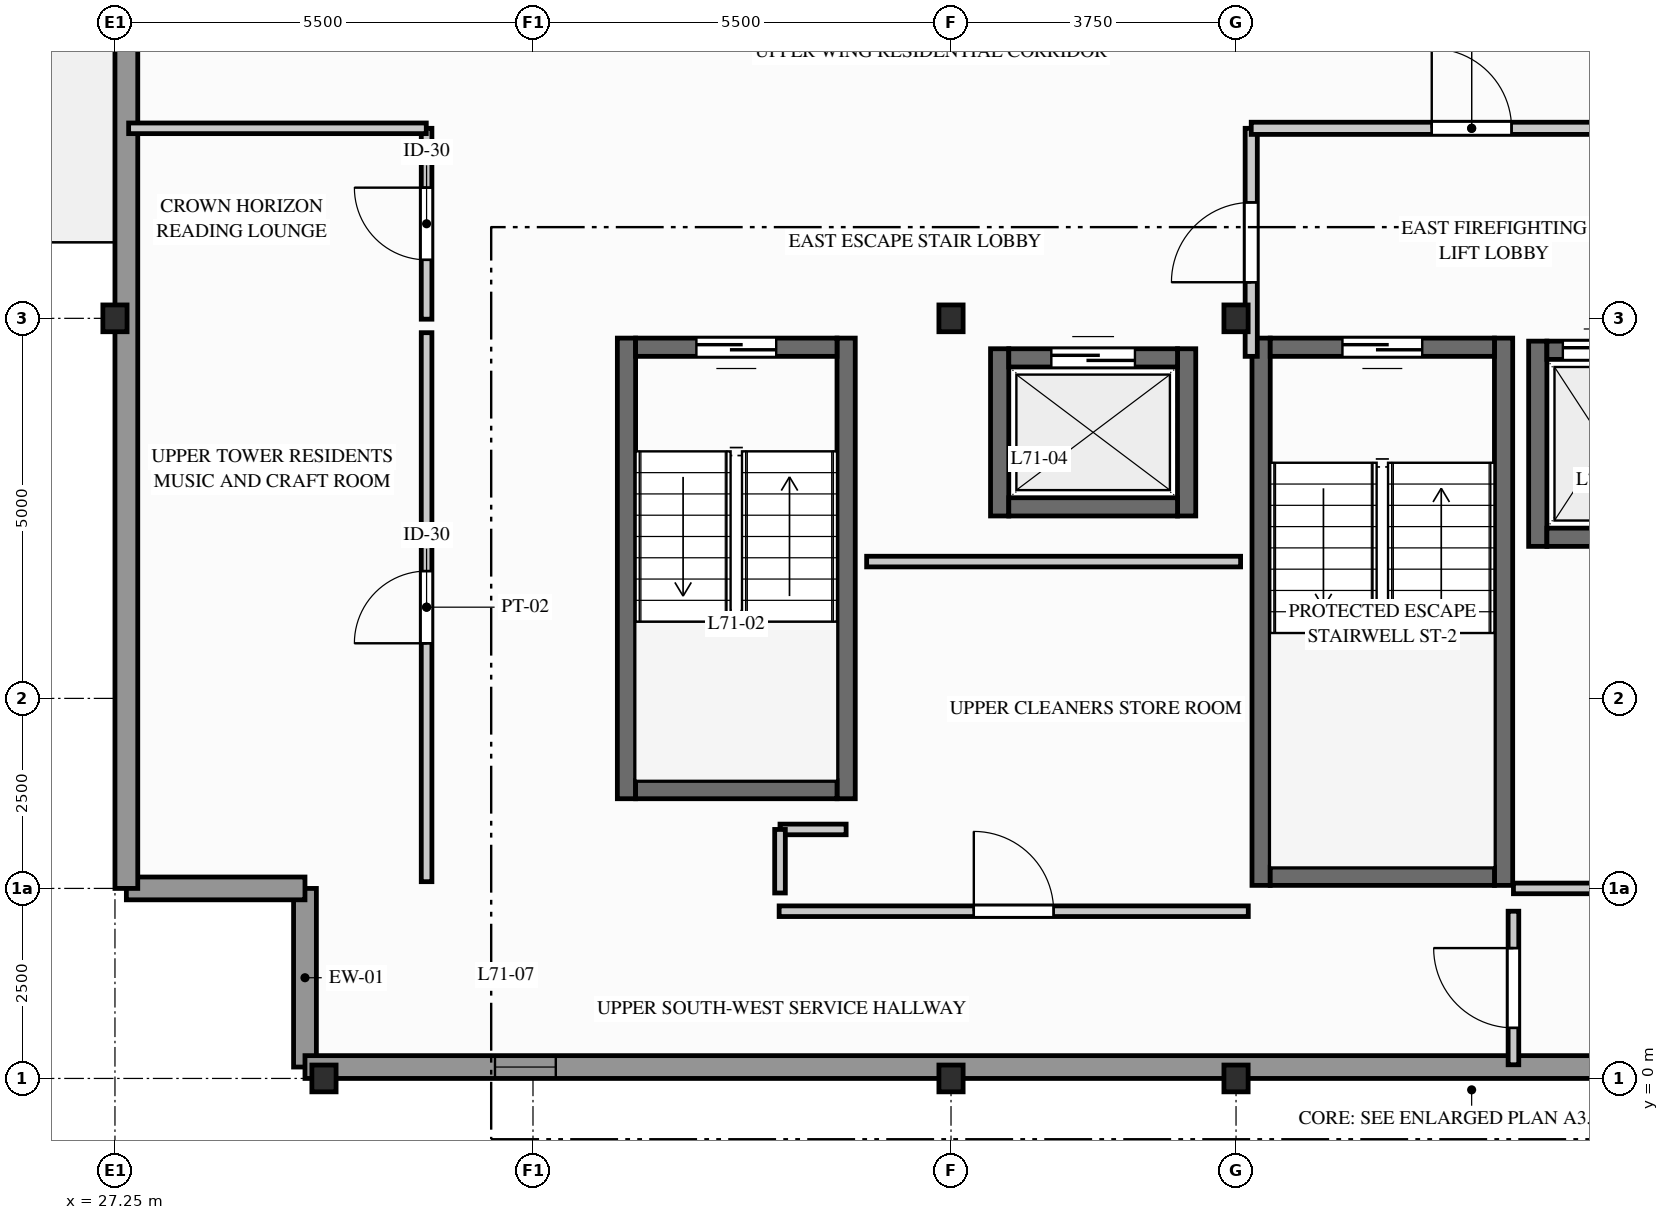
"""IFC4 building model, lengths in metres.
Left out: names, types, materials, properties, quantities, classifications, styles, units other than length and angle.
Written with IfcOpenShell. Run it as: python <this file> out.ifc"""

import sys

from ifc_helpers import new_model, si_unit, direction, frame, frame_2d, origin, origin_2d, place, context, subcontext, project, spatial, rectangle, i_section, extrude, element, fill, save


model = new_model("IFC4")
c1 = context("Model", 3, precision=1e-05, world=origin(), true_north=direction((0.0, 1.0)))
c2 = subcontext(c1, "Body", "Model", "MODEL_VIEW")
j1 = project(units=[si_unit("LENGTHUNIT", "METRE"), si_unit("PLANEANGLEUNIT", "RADIAN")], contexts=[c1])
p1 = place(None, origin())
s1 = spatial("IfcSite", under=j1, at=p1, CompositionType="ELEMENT")
p2 = place(p1, origin())
s2 = spatial("IfcBuilding", under=s1, at=p2, CompositionType="ELEMENT")
p3 = place(p2, frame((0.0, 0.0, 233.5)))
s3 = spatial("IfcBuildingStorey", under=s2, at=p3, CompositionType="ELEMENT", Elevation=233.5)
for number, where, z_axis, x_axis in (
    (1, (27.25, 10.0, 0.0), (0.0, 0.0, 1.0), (1.0, 0.0, 0.0)),
    (2, (30.0, 0.0, 0.0), (0.0, 0.0, 1.0), (1.0, 0.0, 0.0)),
    (3, (38.25, 0.0, 0.0), (0.0, 0.0, 1.0), (1.0, 0.0, 0.0)),
    (4, (38.25, 10.0, 0.0), (0.0, 0.0, 1.0), (1.0, 0.0, 0.0)),
    (5, (42.0, 0.0, 0.0), (0.0, 0.0, 1.0), (1.0, 0.0, 0.0)),
    (6, (42.0, 10.0, 0.0), (0.0, 0.0, 1.0), (1.0, 0.0, 0.0)),
):
    element("IfcColumn", number, at=place(p3, frame(where, z_axis=z_axis, x_axis=x_axis)), inside=s3, PredefinedType="COLUMN", context=c2, shape_type="SweptSolid", body=[
        extrude(i_section(OverallWidth=0.318, OverallDepth=0.353, WebThickness=0.023, FlangeThickness=0.038, FilletRadius=0.015, at=origin_2d()), origin(), (0.0, 0.0, 1.0), 3.1),
    ])
for number, where, z_axis, x_axis in (
    (7, (29.75, 2.5, 0.0), (0.0, 0.0, 1.0), (0.0, -1.0, 0.0)),
    (8, (27.4, 2.5, 0.0), (0.0, 0.0, 1.0), (1.0, 0.0, 0.0)),
):
    element("IfcWall", number, at=place(p3, frame(where, z_axis=z_axis, x_axis=x_axis)), inside=s3, PredefinedType="STANDARD", context=c2, shape_type="SweptSolid", body=[
        extrude(rectangle(XDim=2.35, YDim=0.3, at=frame_2d((1.175, 0.0))), origin(), (0.0, 0.0, 1.0), 2.89),
    ])
p4 = place(p3, frame((29.75, 0.15, 0.0), z_axis=(0.0, 0.0, 1.0), x_axis=(1.0, 0.0, 0.0)))
e9 = element("IfcWall", 9, at=p4, inside=s3, PredefinedType="STANDARD", context=c2, shape_type="SweptSolid", body=[
    extrude(rectangle(XDim=27.75, YDim=0.3, at=frame_2d((13.875, 0.0))), origin(), (0.0, 0.0, 1.0), 2.332),
])
p5 = place(p4, frame((2.5, 0.0, 0.712)))
e10 = element("IfcOpeningElement", 10, at=p5, cuts=e9, PredefinedType="OPENING", context=c2, shape_type="SweptSolid", body=[
    extrude(rectangle(XDim=0.8, YDim=1.4, at=frame_2d((0.4, 0.7))), frame((0.0, 0.16, 0.0), z_axis=(0.0, -1.0, 0.0), x_axis=(1.0, 0.0, 0.0)), (0.0, 0.0, 1.0), 0.32),
])
p6 = place(p4, frame((19.95, 0.0, 0.312)))
e11 = element("IfcOpeningElement", 11, at=p6, cuts=e9, PredefinedType="OPENING", context=c2, shape_type="SweptSolid", body=[
    extrude(rectangle(XDim=1.5, YDim=1.8, at=frame_2d((0.75, 0.9))), frame((0.0, 0.16, 0.0), z_axis=(0.0, -1.0, 0.0), x_axis=(1.0, 0.0, 0.0)), (0.0, 0.0, 1.0), 0.32),
])
p7 = place(p3, frame((27.4, 24.0, 0.0), z_axis=(0.0, 0.0, 1.0), x_axis=(0.0, -1.0, 0.0)))
e12 = element("IfcWall", 12, at=p7, inside=s3, PredefinedType="STANDARD", context=c2, shape_type="SweptSolid", body=[
    extrude(rectangle(XDim=21.5, YDim=0.3, at=frame_2d((10.75, 0.0))), origin(), (0.0, 0.0, 1.0), 2.332),
])
p8 = place(p7, frame((5.5, 0.0, 0.0)))
e13 = element("IfcOpeningElement", 13, at=p8, cuts=e12, PredefinedType="OPENING", context=c2, shape_type="SweptSolid", body=[
    extrude(rectangle(XDim=1.1, YDim=2.2, at=frame_2d((0.55, 1.1))), frame((0.0, 0.16, 0.0), z_axis=(0.0, -1.0, 0.0), x_axis=(1.0, 0.0, 0.0)), (0.0, 0.0, 1.0), 0.32),
])
p9 = place(p7, frame((1.3, 0.0, 0.312)))
e14 = element("IfcOpeningElement", 14, at=p9, cuts=e12, PredefinedType="OPENING", context=c2, shape_type="SweptSolid", body=[
    extrude(rectangle(XDim=1.5, YDim=1.8, at=frame_2d((0.75, 0.9))), frame((0.0, 0.16, 0.0), z_axis=(0.0, -1.0, 0.0), x_axis=(1.0, 0.0, 0.0)), (0.0, 0.0, 1.0), 0.32),
])
for number, where, z_axis, x_axis in (
    (15, (42.33, 2.54, 0.0), (0.0, 0.0, 1.0), (0.0, 1.0, 0.0)),
    (16, (45.52, 2.54, 0.0), (0.0, 0.0, 1.0), (0.0, 1.0, 0.0)),
):
    element("IfcWall", number, at=place(p3, frame(where, z_axis=z_axis, x_axis=x_axis)), inside=s3, PredefinedType="SHEAR", context=c2, shape_type="SweptSolid", body=[
        extrude(rectangle(XDim=7.2, YDim=0.24, at=frame_2d((3.6, 0.0))), origin(), (0.0, 0.0, 1.0), 2.89),
    ])
p10 = place(p3, frame((42.45, 2.66, 0.0), z_axis=(0.0, 0.0, 1.0), x_axis=(1.0, 0.0, 0.0)))
e17 = element("IfcWall", 17, at=p10, inside=s3, PredefinedType="SHEAR", context=c2, shape_type="SweptSolid", body=[
    extrude(rectangle(XDim=2.95, YDim=0.24, at=frame_2d((1.475, 0.0))), origin(), (0.0, 0.0, 1.0), 2.89),
])
p11 = place(p3, frame((45.4, 9.62, 0.0), z_axis=(0.0, 0.0, 1.0), x_axis=(-1.0, 0.0, 0.0)))
e18 = element("IfcWall", 18, at=p11, inside=s3, PredefinedType="SHEAR", context=c2, shape_type="SweptSolid", body=[
    extrude(rectangle(XDim=2.95, YDim=0.24, at=frame_2d((1.475, 0.0))), origin(), (0.0, 0.0, 1.0), 2.89),
])
p12 = place(p11, frame((0.95, 0.0, 0.0)))
e19 = element("IfcOpeningElement", 19, at=p12, cuts=e18, PredefinedType="OPENING", context=c2, shape_type="SweptSolid", body=[
    extrude(rectangle(XDim=1.05, YDim=2.06, at=frame_2d((0.525, 1.03))), frame((0.0, 0.13, 0.0), z_axis=(0.0, -1.0, 0.0), x_axis=(1.0, 0.0, 0.0)), (0.0, 0.0, 1.0), 0.26),
])
for number, where, z_axis, x_axis in (
    (20, (33.98, 3.68, 0.0), (0.0, 0.0, 1.0), (0.0, 1.0, 0.0)),
    (21, (36.87, 3.68, 0.0), (0.0, 0.0, 1.0), (0.0, 1.0, 0.0)),
):
    element("IfcWall", number, at=place(p3, frame(where, z_axis=z_axis, x_axis=x_axis)), inside=s3, PredefinedType="SHEAR", context=c2, shape_type="SweptSolid", body=[
        extrude(rectangle(XDim=6.06, YDim=0.24, at=frame_2d((3.03, 0.0))), origin(), (0.0, 0.0, 1.0), 2.89),
    ])
p13 = place(p3, frame((34.1, 3.8, 0.0), z_axis=(0.0, 0.0, 1.0), x_axis=(1.0, 0.0, 0.0)))
e22 = element("IfcWall", 22, at=p13, inside=s3, PredefinedType="SHEAR", context=c2, shape_type="SweptSolid", body=[
    extrude(rectangle(XDim=2.65, YDim=0.24, at=frame_2d((1.325, 0.0))), origin(), (0.0, 0.0, 1.0), 2.89),
])
p14 = place(p3, frame((36.75, 9.62, 0.0), z_axis=(0.0, 0.0, 1.0), x_axis=(-1.0, 0.0, 0.0)))
e23 = element("IfcWall", 23, at=p14, inside=s3, PredefinedType="SHEAR", context=c2, shape_type="SweptSolid", body=[
    extrude(rectangle(XDim=2.65, YDim=0.24, at=frame_2d((1.325, 0.0))), origin(), (0.0, 0.0, 1.0), 2.89),
])
p15 = place(p14, frame((0.8, 0.0, 0.0)))
e24 = element("IfcOpeningElement", 24, at=p15, cuts=e23, PredefinedType="OPENING", context=c2, shape_type="SweptSolid", body=[
    extrude(rectangle(XDim=1.05, YDim=2.06, at=frame_2d((0.525, 1.03))), frame((0.0, 0.13, 0.0), z_axis=(0.0, -1.0, 0.0), x_axis=(1.0, 0.0, 0.0)), (0.0, 0.0, 1.0), 0.26),
])
p16 = place(p3, frame((45.97, 7.0, 0.0), z_axis=(0.0, 0.0, 1.0), x_axis=(0.0, 1.0, 0.0)))
e25 = element("IfcWall", 25, at=p16, inside=s3, PredefinedType="SHEAR", context=c2, shape_type="SweptSolid", body=[
    extrude(rectangle(XDim=2.7, YDim=0.24, at=frame_2d((1.35, 0.0))), origin(), (0.0, 0.0, 1.0), 2.89),
])
p17 = place(p3, frame((46.09, 7.12, 0.0), z_axis=(0.0, 0.0, 1.0), x_axis=(1.0, 0.0, 0.0)))
e26 = element("IfcWall", 26, at=p17, inside=s3, PredefinedType="SHEAR", context=c2, shape_type="SweptSolid", body=[
    extrude(rectangle(XDim=1.52, YDim=0.24, at=frame_2d((0.76, 0.0))), origin(), (0.0, 0.0, 1.0), 2.89),
])
p18 = place(p3, frame((46.09, 9.58, 0.0), z_axis=(0.0, 0.0, 1.0), x_axis=(1.0, 0.0, 0.0)))
e27 = element("IfcWall", 27, at=p18, inside=s3, PredefinedType="SHEAR", context=c2, shape_type="SweptSolid", body=[
    extrude(rectangle(XDim=1.52, YDim=0.24, at=frame_2d((0.76, 0.0))), origin(), (0.0, 0.0, 1.0), 2.89),
])
p19 = place(p18, frame((0.21, 0.0, 0.0)))
e28 = element("IfcOpeningElement", 28, at=p19, cuts=e27, PredefinedType="OPENING", context=c2, shape_type="SweptSolid", body=[
    extrude(rectangle(XDim=1.1, YDim=2.06, at=frame_2d((0.55, 1.03))), frame((0.0, 0.13, 0.0), z_axis=(0.0, -1.0, 0.0), x_axis=(1.0, 0.0, 0.0)), (0.0, 0.0, 1.0), 0.26),
])
for number, where, z_axis, x_axis in (
    (29, (38.89, 7.4, 0.0), (0.0, 0.0, 1.0), (0.0, 1.0, 0.0)),
    (30, (41.35, 7.4, 0.0), (0.0, 0.0, 1.0), (0.0, 1.0, 0.0)),
):
    element("IfcWall", number, at=place(p3, frame(where, z_axis=z_axis, x_axis=x_axis)), inside=s3, PredefinedType="SHEAR", context=c2, shape_type="SweptSolid", body=[
        extrude(rectangle(XDim=2.2, YDim=0.24, at=frame_2d((1.1, 0.0))), origin(), (0.0, 0.0, 1.0), 2.89),
    ])
p20 = place(p3, frame((39.01, 7.52, 0.0), z_axis=(0.0, 0.0, 1.0), x_axis=(1.0, 0.0, 0.0)))
e31 = element("IfcWall", 31, at=p20, inside=s3, PredefinedType="SHEAR", context=c2, shape_type="SweptSolid", body=[
    extrude(rectangle(XDim=2.22, YDim=0.24, at=frame_2d((1.11, 0.0))), origin(), (0.0, 0.0, 1.0), 2.89),
])
p21 = place(p3, frame((39.01, 9.48, 0.0), z_axis=(0.0, 0.0, 1.0), x_axis=(1.0, 0.0, 0.0)))
e32 = element("IfcWall", 32, at=p21, inside=s3, PredefinedType="SHEAR", context=c2, shape_type="SweptSolid", body=[
    extrude(rectangle(XDim=2.22, YDim=0.24, at=frame_2d((1.11, 0.0))), origin(), (0.0, 0.0, 1.0), 2.89),
])
p22 = place(p21, frame((0.56, 0.0, 0.0)))
e33 = element("IfcOpeningElement", 33, at=p22, cuts=e32, PredefinedType="OPENING", context=c2, shape_type="SweptSolid", body=[
    extrude(rectangle(XDim=1.1, YDim=2.06, at=frame_2d((0.55, 1.03))), frame((0.0, 0.13, 0.0), z_axis=(0.0, -1.0, 0.0), x_axis=(1.0, 0.0, 0.0)), (0.0, 0.0, 1.0), 0.26),
])
p23 = place(p3, frame((31.35, 2.589, 0.0), z_axis=(0.0, 0.0, 1.0), x_axis=(0.0, 1.0, 0.0)))
e34 = element("IfcWall", 34, at=p23, inside=s3, PredefinedType="PARTITIONING", context=c2, shape_type="SweptSolid", body=[
    extrude(rectangle(XDim=7.223, YDim=0.14, at=frame_2d((3.611, 0.0))), origin(), (0.0, 0.0, 1.0), 2.89),
])
p24 = place(p23, frame((3.136, 0.0, 0.0)))
e35 = element("IfcOpeningElement", 35, at=p24, cuts=e34, PredefinedType="OPENING", context=c2, shape_type="SweptSolid", body=[
    extrude(rectangle(XDim=0.95, YDim=2.05, at=frame_2d((0.475, 1.025))), frame((0.0, 0.08, 0.0), z_axis=(0.0, -1.0, 0.0), x_axis=(1.0, 0.0, 0.0)), (0.0, 0.0, 1.0), 0.16),
])
p25 = place(p3, frame((31.35, 9.989, 0.0), z_axis=(0.0, 0.0, 1.0), x_axis=(0.0, 1.0, 0.0)))
e36 = element("IfcWall", 36, at=p25, inside=s3, PredefinedType="PARTITIONING", context=c2, shape_type="SweptSolid", body=[
    extrude(rectangle(XDim=2.511, YDim=0.14, at=frame_2d((1.256, 0.0))), origin(), (0.0, 0.0, 1.0), 2.325),
])
p26 = place(p25, frame((0.781, 0.0, 0.0)))
e37 = element("IfcOpeningElement", 37, at=p26, cuts=e36, PredefinedType="OPENING", context=c2, shape_type="SweptSolid", body=[
    extrude(rectangle(XDim=0.95, YDim=2.05, at=frame_2d((0.475, 1.025))), frame((0.0, 0.08, 0.0), z_axis=(0.0, -1.0, 0.0), x_axis=(1.0, 0.0, 0.0)), (0.0, 0.0, 1.0), 0.16),
])
p27 = place(p3, frame((35.989, 2.2, 0.0), z_axis=(0.0, 0.0, 1.0), x_axis=(1.0, 0.0, 0.0)))
e38 = element("IfcWall", 38, at=p27, inside=s3, PredefinedType="PARTITIONING", context=c2, shape_type="SweptSolid", body=[
    extrude(rectangle(XDim=6.173, YDim=0.14, at=frame_2d((3.086, 0.0))), origin(), (0.0, 0.0, 1.0), 2.325),
])
p28 = place(p27, frame((2.561, 0.0, 0.0)))
e39 = element("IfcOpeningElement", 39, at=p28, cuts=e38, PredefinedType="OPENING", context=c2, shape_type="SweptSolid", body=[
    extrude(rectangle(XDim=1.05, YDim=2.06, at=frame_2d((0.525, 1.03))), frame((0.0, 0.08, 0.0), z_axis=(0.0, -1.0, 0.0), x_axis=(1.0, 0.0, 0.0)), (0.0, 0.0, 1.0), 0.16),
])
p29 = place(p3, frame((45.65, 0.18, 0.0), z_axis=(0.0, 0.0, 1.0), x_axis=(0.0, 1.0, 0.0)))
e40 = element("IfcWall", 40, at=p29, inside=s3, PredefinedType="PARTITIONING", context=c2, shape_type="SweptSolid", body=[
    extrude(rectangle(XDim=2.02, YDim=0.14, at=frame_2d((1.01, 0.0))), origin(), (0.0, 0.0, 1.0), 2.89),
])
p30 = place(p29, frame((0.485, 0.0, 0.0)))
e41 = element("IfcOpeningElement", 41, at=p30, cuts=e40, PredefinedType="OPENING", context=c2, shape_type="SweptSolid", body=[
    extrude(rectangle(XDim=1.05, YDim=2.06, at=frame_2d((0.525, 1.03))), frame((0.0, 0.08, 0.0), z_axis=(0.0, -1.0, 0.0), x_axis=(1.0, 0.0, 0.0)), (0.0, 0.0, 1.0), 0.16),
])
p31 = place(p3, frame((45.65, 2.5, 0.0), z_axis=(0.0, 0.0, 1.0), x_axis=(1.0, 0.0, 0.0)))
e42 = element("IfcWall", 42, at=p31, inside=s3, PredefinedType="PARTITIONING", context=c2, shape_type="SweptSolid", body=[
    extrude(rectangle(XDim=5.761, YDim=0.14, at=frame_2d((2.881, 0.0))), origin(), (0.0, 0.0, 1.0), 2.325),
])
p32 = place(p3, frame((42.2, 9.5, 0.0), z_axis=(0.0, 0.0, 1.0), x_axis=(0.0, 1.0, 0.0)))
e43 = element("IfcWall", 43, at=p32, inside=s3, PredefinedType="PARTITIONING", context=c2, shape_type="SweptSolid", body=[
    extrude(rectangle(XDim=3.0, YDim=0.16, at=frame_2d((1.5, 0.0))), origin(), (0.0, 0.0, 1.0), 2.325),
])
p33 = place(p32, frame((0.975, 0.0, 0.0)))
e44 = element("IfcOpeningElement", 44, at=p33, cuts=e43, PredefinedType="OPENING", context=c2, shape_type="SweptSolid", body=[
    extrude(rectangle(XDim=1.05, YDim=2.06, at=frame_2d((0.525, 1.03))), frame((0.0, 0.09, 0.0), z_axis=(0.0, -1.0, 0.0), x_axis=(1.0, 0.0, 0.0)), (0.0, 0.0, 1.0), 0.18),
])
p34 = place(p3, frame((42.2, 12.5, 0.0), z_axis=(0.0, 0.0, 1.0), x_axis=(1.0, 0.0, 0.0)))
e45 = element("IfcWall", 45, at=p34, inside=s3, PredefinedType="PARTITIONING", context=c2, shape_type="SweptSolid", body=[
    extrude(rectangle(XDim=5.8, YDim=0.16, at=frame_2d((2.9, 0.0))), origin(), (0.0, 0.0, 1.0), 2.325),
])
p35 = place(p34, frame((2.375, 0.0, 0.0)))
e46 = element("IfcOpeningElement", 46, at=p35, cuts=e45, PredefinedType="OPENING", context=c2, shape_type="SweptSolid", body=[
    extrude(rectangle(XDim=1.05, YDim=2.06, at=frame_2d((0.525, 1.03))), frame((0.0, 0.09, 0.0), z_axis=(0.0, -1.0, 0.0), x_axis=(1.0, 0.0, 0.0)), (0.0, 0.0, 1.0), 0.18),
])
p36 = place(p3, frame((27.43, 12.5, 0.0), z_axis=(0.0, 0.0, 1.0), x_axis=(1.0, 0.0, 0.0)))
e47 = element("IfcWall", 47, at=p36, inside=s3, PredefinedType="PARTITIONING", context=c2, shape_type="SweptSolid", body=[
    extrude(rectangle(XDim=3.916, YDim=0.14, at=frame_2d((1.958, 0.0))), origin(), (0.0, 0.0, 1.0), 2.89),
])
p37 = place(p3, frame((37.14, 6.8, 0.0), z_axis=(0.0, 0.0, 1.0), x_axis=(1.0, 0.0, 0.0)))
e48 = element("IfcWall", 48, at=p37, inside=s3, PredefinedType="PARTITIONING", context=c2, shape_type="SweptSolid", body=[
    extrude(rectangle(XDim=4.92, YDim=0.14, at=frame_2d((2.46, 0.0))), origin(), (0.0, 0.0, 1.0), 2.325),
])
p38 = place(p3, frame((36.0, 3.276, 0.0), z_axis=(0.0, 0.0, 1.0), x_axis=(1.0, 0.0, 0.0)))
e49 = element("IfcWall", 49, at=p38, inside=s3, PredefinedType="PARTITIONING", context=c2, shape_type="SweptSolid", body=[
    extrude(rectangle(XDim=0.87, YDim=0.14, at=frame_2d((0.435, 0.0))), origin(), (0.0, 0.0, 1.0), 2.89),
])
p39 = place(p3, frame((36.0, 2.44, 0.0), z_axis=(0.0, 0.0, 1.0), x_axis=(0.0, 1.0, 0.0)))
e50 = element("IfcWall", 50, at=p39, inside=s3, PredefinedType="PARTITIONING", context=c2, shape_type="SweptSolid", body=[
    extrude(rectangle(XDim=0.836, YDim=0.14, at=frame_2d((0.418, 0.0))), origin(), (0.0, 0.0, 1.0), 2.89),
])
p40 = place(p5, origin())
e51 = element("IfcWindow", 51, at=p40, inside=s3, PartitioningType="SINGLE_PANEL", PredefinedType="WINDOW", context=c2, shape_type="SweptSolid", body=[
    extrude(rectangle(XDim=0.8, YDim=1.4, at=frame_2d((0.4, 0.7))), frame((0.0, 0.03, 0.0), z_axis=(0.0, -1.0, 0.0), x_axis=(1.0, 0.0, 0.0)), (0.0, 0.0, 1.0), 0.06),
])
fill(e10, e51)
p41 = place(p12, origin())
e52 = element("IfcDoor", 52, at=p41, inside=s3, OperationType="SINGLE_SWING_RIGHT", PredefinedType="DOOR", context=c2, shape_type="SweptSolid", body=[
    extrude(rectangle(XDim=1.05, YDim=2.06, at=frame_2d((0.525, 1.03))), frame((0.0, 0.025, 0.0), z_axis=(0.0, -1.0, 0.0), x_axis=(1.0, 0.0, 0.0)), (0.0, 0.0, 1.0), 0.05),
])
fill(e19, e52)
p42 = place(p15, origin())
e53 = element("IfcDoor", 53, at=p42, inside=s3, OperationType="SINGLE_SWING_RIGHT", PredefinedType="DOOR", context=c2, shape_type="SweptSolid", body=[
    extrude(rectangle(XDim=1.05, YDim=2.06, at=frame_2d((0.525, 1.03))), frame((0.0, 0.025, 0.0), z_axis=(0.0, -1.0, 0.0), x_axis=(1.0, 0.0, 0.0)), (0.0, 0.0, 1.0), 0.05),
])
fill(e24, e53)
p43 = place(p19, origin())
e54 = element("IfcDoor", 54, at=p43, inside=s3, OperationType="SLIDING_TO_RIGHT", PredefinedType="DOOR", context=c2, shape_type="SweptSolid", body=[
    extrude(rectangle(XDim=1.1, YDim=2.06, at=frame_2d((0.55, 1.03))), frame((0.0, 0.025, 0.0), z_axis=(0.0, -1.0, 0.0), x_axis=(1.0, 0.0, 0.0)), (0.0, 0.0, 1.0), 0.05),
])
fill(e28, e54)
p44 = place(p22, origin())
e55 = element("IfcDoor", 55, at=p44, inside=s3, OperationType="SLIDING_TO_LEFT", PredefinedType="DOOR", context=c2, shape_type="SweptSolid", body=[
    extrude(rectangle(XDim=1.1, YDim=2.06, at=frame_2d((0.55, 1.03))), frame((0.0, 0.025, 0.0), z_axis=(0.0, -1.0, 0.0), x_axis=(1.0, 0.0, 0.0)), (0.0, 0.0, 1.0), 0.05),
])
fill(e33, e55)
p45 = place(p24, origin())
e56 = element("IfcDoor", 56, at=p45, inside=s3, OperationType="SINGLE_SWING_LEFT", PredefinedType="DOOR", context=c2, shape_type="SweptSolid", body=[
    extrude(rectangle(XDim=0.95, YDim=2.05, at=frame_2d((0.475, 1.025))), frame((0.0, 0.025, 0.0), z_axis=(0.0, -1.0, 0.0), x_axis=(1.0, 0.0, 0.0)), (0.0, 0.0, 1.0), 0.05),
])
fill(e35, e56)
p46 = place(p26, origin())
e57 = element("IfcDoor", 57, at=p46, inside=s3, OperationType="SINGLE_SWING_RIGHT", PredefinedType="DOOR", context=c2, shape_type="SweptSolid", body=[
    extrude(rectangle(XDim=0.95, YDim=2.05, at=frame_2d((0.475, 1.025))), frame((0.0, 0.025, 0.0), z_axis=(0.0, -1.0, 0.0), x_axis=(1.0, 0.0, 0.0)), (0.0, 0.0, 1.0), 0.05),
])
fill(e37, e57)
p47 = place(p28, origin())
e58 = element("IfcDoor", 58, at=p47, inside=s3, OperationType="SINGLE_SWING_LEFT", PredefinedType="DOOR", context=c2, shape_type="SweptSolid", body=[
    extrude(rectangle(XDim=1.05, YDim=2.06, at=frame_2d((0.525, 1.03))), frame((0.0, 0.025, 0.0), z_axis=(0.0, -1.0, 0.0), x_axis=(1.0, 0.0, 0.0)), (0.0, 0.0, 1.0), 0.05),
])
fill(e39, e58)
p48 = place(p30, origin())
e59 = element("IfcDoor", 59, at=p48, inside=s3, OperationType="SINGLE_SWING_RIGHT", PredefinedType="DOOR", context=c2, shape_type="SweptSolid", body=[
    extrude(rectangle(XDim=1.05, YDim=2.06, at=frame_2d((0.525, 1.03))), frame((0.0, 0.025, 0.0), z_axis=(0.0, -1.0, 0.0), x_axis=(1.0, 0.0, 0.0)), (0.0, 0.0, 1.0), 0.05),
])
fill(e41, e59)
p49 = place(p33, origin())
e60 = element("IfcDoor", 60, at=p49, inside=s3, OperationType="SINGLE_SWING_LEFT", PredefinedType="DOOR", context=c2, shape_type="SweptSolid", body=[
    extrude(rectangle(XDim=1.05, YDim=2.06, at=frame_2d((0.525, 1.03))), frame((0.0, 0.025, 0.0), z_axis=(0.0, -1.0, 0.0), x_axis=(1.0, 0.0, 0.0)), (0.0, 0.0, 1.0), 0.05),
])
fill(e44, e60)
p50 = place(p35, origin())
e61 = element("IfcDoor", 61, at=p50, inside=s3, OperationType="SINGLE_SWING_LEFT", PredefinedType="DOOR", context=c2, shape_type="SweptSolid", body=[
    extrude(rectangle(XDim=1.05, YDim=2.06, at=frame_2d((0.525, 1.03))), frame((0.0, 0.025, 0.0), z_axis=(0.0, -1.0, 0.0), x_axis=(1.0, 0.0, 0.0)), (0.0, 0.0, 1.0), 0.05),
])
fill(e46, e61)
save(model, sys.argv[1])
